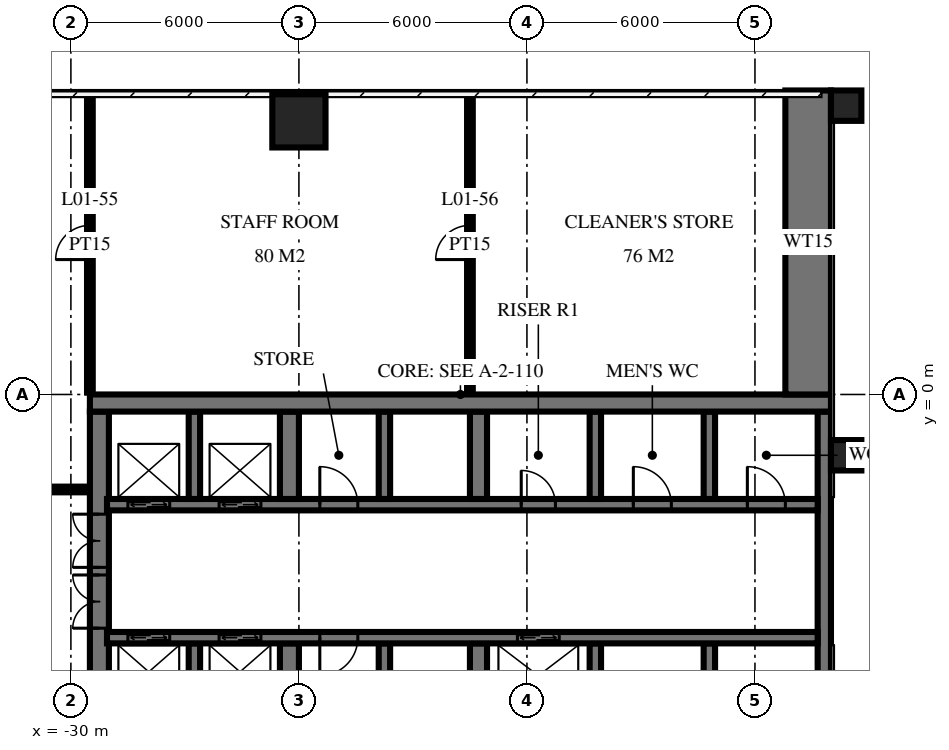
"""IFC4 building model, lengths in metres.
Left out: names, types, materials, properties, quantities, classifications, styles, units other than length and angle.
Written with IfcOpenShell. Run it as: python <this file> out.ifc"""

import sys

from ifc_helpers import new_model, si_unit, direction, frame, frame_2d, origin, origin_2d, place, context, subcontext, project, spatial, rectangle, circle, extrude, element, fill, save


model = new_model("IFC4")
c1 = context("Model", 3, precision=1e-05, world=origin(), true_north=direction((0.0, 1.0)))
c2 = subcontext(c1, "Body", "Model", "MODEL_VIEW")
j1 = project(units=[si_unit("LENGTHUNIT", "METRE"), si_unit("PLANEANGLEUNIT", "RADIAN")], contexts=[c1])
p1 = place(None, origin())
s1 = spatial("IfcSite", under=j1, at=p1, CompositionType="ELEMENT")
p2 = place(p1, origin())
s2 = spatial("IfcBuilding", under=s1, at=p2, CompositionType="ELEMENT")
p3 = place(p2, frame((0.0, 0.0, 7.0)))
s3 = spatial("IfcBuildingStorey", under=s2, at=p3, CompositionType="ELEMENT", Elevation=7.0)
p4 = place(p3, frame((-24.0, 7.2, 0.0), z_axis=(0.0, 0.0, 1.0), x_axis=(1.0, 0.0, 0.0)))
e1 = element("IfcColumn", 1, at=p4, inside=s3, PredefinedType="COLUMN", context=c2, shape_type="SweptSolid", body=[
    extrude(circle(Radius=0.7, at=origin_2d()), origin(), (0.0, 0.0, 1.0), 5.5),
])
p5 = place(p3, frame((-29.5, -0.225, 0.0), z_axis=(0.0, 0.0, 1.0), x_axis=(1.0, 0.0, 0.0)))
e2 = element("IfcWall", 2, at=p5, inside=s3, PredefinedType="SHEAR", context=c2, shape_type="SweptSolid", body=[
    extrude(rectangle(XDim=19.5, YDim=0.45, at=frame_2d((9.75, 0.0))), origin(), (0.0, 0.0, 1.0), 5.5),
])
p6 = place(p3, frame((-10.175, -14.55, 0.0), z_axis=(0.0, 0.0, 1.0), x_axis=(0.0, 1.0, 0.0)))
e3 = element("IfcWall", 3, at=p6, inside=s3, PredefinedType="SHEAR", context=c2, shape_type="SweptSolid", body=[
    extrude(rectangle(XDim=14.1, YDim=0.35, at=frame_2d((7.05, 0.0))), origin(), (0.0, 0.0, 1.0), 5.5),
])
p7 = place(p3, frame((-29.25, -14.55, 0.0), z_axis=(0.0, 0.0, 1.0), x_axis=(0.0, 1.0, 0.0)))
e4 = element("IfcWall", 4, at=p7, inside=s3, PredefinedType="SHEAR", context=c2, shape_type="SweptSolid", body=[
    extrude(rectangle(XDim=14.1, YDim=0.5, at=frame_2d((7.05, 0.0))), origin(), (0.0, 0.0, 1.0), 5.5),
])
p8 = place(p7, frame((8.4, 0.0, 0.0)))
e5 = element("IfcOpeningElement", 5, at=p8, cuts=e4, PredefinedType="OPENING", context=c2, shape_type="SweptSolid", body=[
    extrude(rectangle(XDim=1.4, YDim=2.4, at=frame_2d((0.7, 1.2))), frame((0.0, 0.26, 0.0), z_axis=(0.0, -1.0, 0.0), x_axis=(1.0, 0.0, 0.0)), (0.0, 0.0, 1.0), 0.52),
])
p9 = place(p7, frame((10.0, 0.0, 0.0)))
e6 = element("IfcOpeningElement", 6, at=p9, cuts=e4, PredefinedType="OPENING", context=c2, shape_type="SweptSolid", body=[
    extrude(rectangle(XDim=1.4, YDim=2.4, at=frame_2d((0.7, 1.2))), frame((0.0, 0.26, 0.0), z_axis=(0.0, -1.0, 0.0), x_axis=(1.0, 0.0, 0.0)), (0.0, 0.0, 1.0), 0.52),
])
p10 = place(p3, frame((-29.05, -2.9, 0.0), z_axis=(0.0, 0.0, 1.0), x_axis=(1.0, 0.0, 0.0)))
e7 = element("IfcWall", 7, at=p10, inside=s3, PredefinedType="SHEAR", context=c2, shape_type="SweptSolid", body=[
    extrude(rectangle(XDim=18.7, YDim=0.3, at=frame_2d((9.35, 0.0))), origin(), (0.0, 0.0, 1.0), 5.5),
])
p11 = place(p10, frame((2.95, 0.0, 0.0)))
e8 = element("IfcOpeningElement", 8, at=p11, cuts=e7, PredefinedType="OPENING", context=c2, shape_type="SweptSolid", body=[
    extrude(rectangle(XDim=1.1, YDim=2.1, at=frame_2d((0.55, 1.05))), frame((0.0, 0.16, 0.0), z_axis=(0.0, -1.0, 0.0), x_axis=(1.0, 0.0, 0.0)), (0.0, 0.0, 1.0), 0.32),
])
p12 = place(p10, frame((0.55, 0.0, 0.0)))
e9 = element("IfcOpeningElement", 9, at=p12, cuts=e7, PredefinedType="OPENING", context=c2, shape_type="SweptSolid", body=[
    extrude(rectangle(XDim=1.1, YDim=2.1, at=frame_2d((0.55, 1.05))), frame((0.0, 0.16, 0.0), z_axis=(0.0, -1.0, 0.0), x_axis=(1.0, 0.0, 0.0)), (0.0, 0.0, 1.0), 0.32),
])
p13 = place(p10, frame((10.9, 0.0, 0.0)))
e10 = element("IfcOpeningElement", 10, at=p13, cuts=e7, PredefinedType="OPENING", context=c2, shape_type="SweptSolid", body=[
    extrude(rectangle(XDim=0.9, YDim=2.1, at=frame_2d((0.45, 1.05))), frame((0.0, 0.16, 0.0), z_axis=(0.0, -1.0, 0.0), x_axis=(1.0, 0.0, 0.0)), (0.0, 0.0, 1.0), 0.32),
])
p14 = place(p10, frame((16.85, 0.0, 0.0)))
e11 = element("IfcOpeningElement", 11, at=p14, cuts=e7, PredefinedType="OPENING", context=c2, shape_type="SweptSolid", body=[
    extrude(rectangle(XDim=1.0, YDim=2.1, at=frame_2d((0.5, 1.05))), frame((0.0, 0.16, 0.0), z_axis=(0.0, -1.0, 0.0), x_axis=(1.0, 0.0, 0.0)), (0.0, 0.0, 1.0), 0.32),
])
p15 = place(p10, frame((13.85, 0.0, 0.0)))
e12 = element("IfcOpeningElement", 12, at=p15, cuts=e7, PredefinedType="OPENING", context=c2, shape_type="SweptSolid", body=[
    extrude(rectangle(XDim=1.0, YDim=2.1, at=frame_2d((0.5, 1.05))), frame((0.0, 0.16, 0.0), z_axis=(0.0, -1.0, 0.0), x_axis=(1.0, 0.0, 0.0)), (0.0, 0.0, 1.0), 0.32),
])
p16 = place(p10, frame((5.6, 0.0, 0.0)))
e13 = element("IfcOpeningElement", 13, at=p16, cuts=e7, PredefinedType="OPENING", context=c2, shape_type="SweptSolid", body=[
    extrude(rectangle(XDim=1.0, YDim=2.1, at=frame_2d((0.5, 1.05))), frame((0.0, 0.16, 0.0), z_axis=(0.0, -1.0, 0.0), x_axis=(1.0, 0.0, 0.0)), (0.0, 0.0, 1.0), 0.32),
])
p17 = place(p3, frame((-29.05, -6.4, 0.0), z_axis=(0.0, 0.0, 1.0), x_axis=(1.0, 0.0, 0.0)))
e14 = element("IfcWall", 14, at=p17, inside=s3, PredefinedType="SHEAR", context=c2, shape_type="SweptSolid", body=[
    extrude(rectangle(XDim=18.7, YDim=0.3, at=frame_2d((9.35, 0.0))), origin(), (0.0, 0.0, 1.0), 5.5),
])
p18 = place(p17, frame((2.95, 0.0, 0.0)))
e15 = element("IfcOpeningElement", 15, at=p18, cuts=e14, PredefinedType="OPENING", context=c2, shape_type="SweptSolid", body=[
    extrude(rectangle(XDim=1.1, YDim=2.1, at=frame_2d((0.55, 1.05))), frame((0.0, 0.16, 0.0), z_axis=(0.0, -1.0, 0.0), x_axis=(1.0, 0.0, 0.0)), (0.0, 0.0, 1.0), 0.32),
])
p19 = place(p17, frame((0.55, 0.0, 0.0)))
e16 = element("IfcOpeningElement", 16, at=p19, cuts=e14, PredefinedType="OPENING", context=c2, shape_type="SweptSolid", body=[
    extrude(rectangle(XDim=1.1, YDim=2.1, at=frame_2d((0.55, 1.05))), frame((0.0, 0.16, 0.0), z_axis=(0.0, -1.0, 0.0), x_axis=(1.0, 0.0, 0.0)), (0.0, 0.0, 1.0), 0.32),
])
p20 = place(p17, frame((10.8, 0.0, 0.0)))
e17 = element("IfcOpeningElement", 17, at=p20, cuts=e14, PredefinedType="OPENING", context=c2, shape_type="SweptSolid", body=[
    extrude(rectangle(XDim=1.1, YDim=2.1, at=frame_2d((0.55, 1.05))), frame((0.0, 0.16, 0.0), z_axis=(0.0, -1.0, 0.0), x_axis=(1.0, 0.0, 0.0)), (0.0, 0.0, 1.0), 0.32),
])
p21 = place(p17, frame((5.6, 0.0, 0.0)))
e18 = element("IfcOpeningElement", 18, at=p21, cuts=e14, PredefinedType="OPENING", context=c2, shape_type="SweptSolid", body=[
    extrude(rectangle(XDim=1.0, YDim=2.1, at=frame_2d((0.5, 1.05))), frame((0.0, 0.16, 0.0), z_axis=(0.0, -1.0, 0.0), x_axis=(1.0, 0.0, 0.0)), (0.0, 0.0, 1.0), 0.32),
])
for number, where, z_axis, x_axis in (
    (19, (-13.2, -2.75, 0.0), (0.0, 0.0, 1.0), (0.0, 1.0, 0.0)),
    (20, (-13.2, -8.85, 0.0), (0.0, 0.0, 1.0), (0.0, 1.0, 0.0)),
    (21, (-16.2, -2.75, 0.0), (0.0, 0.0, 1.0), (0.0, 1.0, 0.0)),
    (22, (-16.2, -8.85, 0.0), (0.0, 0.0, 1.0), (0.0, 1.0, 0.0)),
):
    element("IfcWall", number, at=place(p3, frame(where, z_axis=z_axis, x_axis=x_axis)), inside=s3, PredefinedType="SHEAR", context=c2, shape_type="SweptSolid", body=[
        extrude(rectangle(XDim=2.3, YDim=0.3, at=frame_2d((1.15, 0.0))), origin(), (0.0, 0.0, 1.0), 5.5),
    ])
for number, where, z_axis, x_axis in (
    (23, (-19.275, -2.75, 0.0), (0.0, 0.0, 1.0), (0.0, 1.0, 0.0)),
    (24, (-19.275, -8.85, 0.0), (0.0, 0.0, 1.0), (0.0, 1.0, 0.0)),
):
    element("IfcWall", number, at=place(p3, frame(where, z_axis=z_axis, x_axis=x_axis)), inside=s3, PredefinedType="SHEAR", context=c2, shape_type="SweptSolid", body=[
        extrude(rectangle(XDim=2.3, YDim=0.45, at=frame_2d((1.15, 0.0))), origin(), (0.0, 0.0, 1.0), 5.5),
    ])
for number, where, z_axis, x_axis in (
    (25, (-21.75, -2.75, 0.0), (0.0, 0.0, 1.0), (0.0, 1.0, 0.0)),
    (26, (-21.75, -8.85, 0.0), (0.0, 0.0, 1.0), (0.0, 1.0, 0.0)),
):
    element("IfcWall", number, at=place(p3, frame(where, z_axis=z_axis, x_axis=x_axis)), inside=s3, PredefinedType="SHEAR", context=c2, shape_type="SweptSolid", body=[
        extrude(rectangle(XDim=2.3, YDim=0.3, at=frame_2d((1.15, 0.0))), origin(), (0.0, 0.0, 1.0), 5.5),
    ])
for number, where, z_axis, x_axis in (
    (27, (-24.25, -2.75, 0.0), (0.0, 0.0, 1.0), (0.0, 1.0, 0.0)),
    (28, (-24.25, -8.85, 0.0), (0.0, 0.0, 1.0), (0.0, 1.0, 0.0)),
):
    element("IfcWall", number, at=place(p3, frame(where, z_axis=z_axis, x_axis=x_axis)), inside=s3, PredefinedType="SHEAR", context=c2, shape_type="SweptSolid", body=[
        extrude(rectangle(XDim=2.3, YDim=0.5, at=frame_2d((1.15, 0.0))), origin(), (0.0, 0.0, 1.0), 5.5),
    ])
for number, where, z_axis, x_axis in (
    (29, (-26.75, -2.75, 0.0), (0.0, 0.0, 1.0), (0.0, 1.0, 0.0)),
    (30, (-26.75, -8.85, 0.0), (0.0, 0.0, 1.0), (0.0, 1.0, 0.0)),
):
    element("IfcWall", number, at=place(p3, frame(where, z_axis=z_axis, x_axis=x_axis)), inside=s3, PredefinedType="SHEAR", context=c2, shape_type="SweptSolid", body=[
        extrude(rectangle(XDim=2.3, YDim=0.3, at=frame_2d((1.15, 0.0))), origin(), (0.0, 0.0, 1.0), 5.5),
    ])
p22 = place(p3, frame((-10.6, 0.0, 0.0), z_axis=(0.0, 0.0, 1.0), x_axis=(0.0, 1.0, 0.0)))
e31 = element("IfcWall", 31, at=p22, inside=s3, PredefinedType="SHEAR", context=c2, shape_type="SweptSolid", body=[
    extrude(rectangle(XDim=8.0, YDim=1.2, at=frame_2d((4.0, 0.0))), origin(), (0.0, 0.0, 1.0), 5.5),
])
for number, where, z_axis, x_axis in (
    (32, (-9.6, -1.6, 0.0), (0.0, 0.0, 1.0), (1.0, 0.0, 0.0)),
    (33, (-9.6, 7.6, 0.0), (0.0, 0.0, 1.0), (1.0, 0.0, 0.0)),
):
    element("IfcColumn", number, at=place(p3, frame(where, z_axis=z_axis, x_axis=x_axis)), inside=s3, PredefinedType="COLUMN", context=c2, shape_type="SweptSolid", body=[
        extrude(rectangle(XDim=0.8, YDim=0.8, at=origin_2d()), origin(), (0.0, 0.0, 1.0), 5.5),
    ])
p23 = place(p3, frame((-19.5, 0.05, 0.0), z_axis=(0.0, 0.0, 1.0), x_axis=(0.0, 1.0, 0.0)))
e34 = element("IfcWall", 34, at=p23, inside=s3, PredefinedType="PARTITIONING", context=c2, shape_type="SweptSolid", body=[
    extrude(rectangle(XDim=7.77, YDim=0.15, at=frame_2d((3.885, 0.0))), origin(), (0.0, 0.0, 1.0), 5.05),
])
p24 = place(p23, frame((3.5, 0.0, 0.0)))
e35 = element("IfcOpeningElement", 35, at=p24, cuts=e34, PredefinedType="OPENING", context=c2, shape_type="SweptSolid", body=[
    extrude(rectangle(XDim=0.9, YDim=2.1, at=frame_2d((0.45, 1.05))), frame((0.0, 0.085, 0.0), z_axis=(0.0, -1.0, 0.0), x_axis=(1.0, 0.0, 0.0)), (0.0, 0.0, 1.0), 0.17),
])
p25 = place(p3, frame((-29.5, 0.05, 0.0), z_axis=(0.0, 0.0, 1.0), x_axis=(0.0, 1.0, 0.0)))
e36 = element("IfcWall", 36, at=p25, inside=s3, PredefinedType="PARTITIONING", context=c2, shape_type="SweptSolid", body=[
    extrude(rectangle(XDim=7.77, YDim=0.15, at=frame_2d((3.885, 0.0))), origin(), (0.0, 0.0, 1.0), 5.05),
])
p26 = place(p25, frame((3.5, 0.0, 0.0)))
e37 = element("IfcOpeningElement", 37, at=p26, cuts=e36, PredefinedType="OPENING", context=c2, shape_type="SweptSolid", body=[
    extrude(rectangle(XDim=0.9, YDim=2.1, at=frame_2d((0.45, 1.05))), frame((0.0, 0.085, 0.0), z_axis=(0.0, -1.0, 0.0), x_axis=(1.0, 0.0, 0.0)), (0.0, 0.0, 1.0), 0.17),
])
p27 = place(p3, frame((-31.9, -2.5, 0.0), z_axis=(0.0, 0.0, 1.0), x_axis=(1.0, 0.0, 0.0)))
e38 = element("IfcWall", 38, at=p27, inside=s3, PredefinedType="PARTITIONING", context=c2, shape_type="SweptSolid", body=[
    extrude(rectangle(XDim=2.35, YDim=0.15, at=frame_2d((1.175, 0.0))), origin(), (0.0, 0.0, 1.0), 5.05),
])
p28 = place(p11, origin())
e39 = element("IfcDoor", 39, at=p28, inside=s3, OperationType="DOUBLE_DOOR_SLIDING", PredefinedType="USERDEFINED", context=c2, shape_type="SweptSolid", body=[
    extrude(rectangle(XDim=1.1, YDim=2.1, at=frame_2d((0.55, 1.05))), frame((0.0, 0.025, 0.0), z_axis=(0.0, -1.0, 0.0), x_axis=(1.0, 0.0, 0.0)), (0.0, 0.0, 1.0), 0.05),
])
fill(e8, e39)
p29 = place(p12, origin())
e40 = element("IfcDoor", 40, at=p29, inside=s3, OperationType="DOUBLE_DOOR_SLIDING", PredefinedType="USERDEFINED", context=c2, shape_type="SweptSolid", body=[
    extrude(rectangle(XDim=1.1, YDim=2.1, at=frame_2d((0.55, 1.05))), frame((0.0, 0.025, 0.0), z_axis=(0.0, -1.0, 0.0), x_axis=(1.0, 0.0, 0.0)), (0.0, 0.0, 1.0), 0.05),
])
fill(e9, e40)
p30 = place(p18, origin())
e41 = element("IfcDoor", 41, at=p30, inside=s3, OperationType="DOUBLE_DOOR_SLIDING", PredefinedType="USERDEFINED", context=c2, shape_type="SweptSolid", body=[
    extrude(rectangle(XDim=1.1, YDim=2.1, at=frame_2d((0.55, 1.05))), frame((0.0, 0.025, 0.0), z_axis=(0.0, -1.0, 0.0), x_axis=(1.0, 0.0, 0.0)), (0.0, 0.0, 1.0), 0.05),
])
fill(e15, e41)
p31 = place(p19, origin())
e42 = element("IfcDoor", 42, at=p31, inside=s3, OperationType="DOUBLE_DOOR_SLIDING", PredefinedType="USERDEFINED", context=c2, shape_type="SweptSolid", body=[
    extrude(rectangle(XDim=1.1, YDim=2.1, at=frame_2d((0.55, 1.05))), frame((0.0, 0.025, 0.0), z_axis=(0.0, -1.0, 0.0), x_axis=(1.0, 0.0, 0.0)), (0.0, 0.0, 1.0), 0.05),
])
fill(e16, e42)
p32 = place(p20, origin())
e43 = element("IfcDoor", 43, at=p32, inside=s3, OperationType="DOUBLE_DOOR_SLIDING", PredefinedType="USERDEFINED", context=c2, shape_type="SweptSolid", body=[
    extrude(rectangle(XDim=1.1, YDim=2.1, at=frame_2d((0.55, 1.05))), frame((0.0, 0.025, 0.0), z_axis=(0.0, -1.0, 0.0), x_axis=(1.0, 0.0, 0.0)), (0.0, 0.0, 1.0), 0.05),
])
fill(e17, e43)
p33 = place(p8, origin())
e44 = element("IfcDoor", 44, at=p33, inside=s3, OperationType="DOUBLE_DOOR_SINGLE_SWING", PredefinedType="DOOR", context=c2, shape_type="SweptSolid", body=[
    extrude(rectangle(XDim=1.4, YDim=2.4, at=frame_2d((0.7, 1.2))), frame((0.0, 0.025, 0.0), z_axis=(0.0, -1.0, 0.0), x_axis=(1.0, 0.0, 0.0)), (0.0, 0.0, 1.0), 0.05),
])
fill(e5, e44)
p34 = place(p9, origin())
e45 = element("IfcDoor", 45, at=p34, inside=s3, OperationType="DOUBLE_DOOR_SINGLE_SWING", PredefinedType="DOOR", context=c2, shape_type="SweptSolid", body=[
    extrude(rectangle(XDim=1.4, YDim=2.4, at=frame_2d((0.7, 1.2))), frame((0.0, 0.025, 0.0), z_axis=(0.0, -1.0, 0.0), x_axis=(1.0, 0.0, 0.0)), (0.0, 0.0, 1.0), 0.05),
])
fill(e6, e45)
p35 = place(p13, origin())
e46 = element("IfcDoor", 46, at=p35, inside=s3, OperationType="SINGLE_SWING_RIGHT", PredefinedType="DOOR", context=c2, shape_type="SweptSolid", body=[
    extrude(rectangle(XDim=0.9, YDim=2.1, at=frame_2d((0.45, 1.05))), frame((0.0, 0.025, 0.0), z_axis=(0.0, -1.0, 0.0), x_axis=(1.0, 0.0, 0.0)), (0.0, 0.0, 1.0), 0.05),
])
fill(e10, e46)
p36 = place(p14, origin())
e47 = element("IfcDoor", 47, at=p36, inside=s3, OperationType="SINGLE_SWING_RIGHT", PredefinedType="DOOR", context=c2, shape_type="SweptSolid", body=[
    extrude(rectangle(XDim=1.0, YDim=2.1, at=frame_2d((0.5, 1.05))), frame((0.0, 0.025, 0.0), z_axis=(0.0, -1.0, 0.0), x_axis=(1.0, 0.0, 0.0)), (0.0, 0.0, 1.0), 0.05),
])
fill(e11, e47)
p37 = place(p15, origin())
e48 = element("IfcDoor", 48, at=p37, inside=s3, OperationType="SINGLE_SWING_RIGHT", PredefinedType="DOOR", context=c2, shape_type="SweptSolid", body=[
    extrude(rectangle(XDim=1.0, YDim=2.1, at=frame_2d((0.5, 1.05))), frame((0.0, 0.025, 0.0), z_axis=(0.0, -1.0, 0.0), x_axis=(1.0, 0.0, 0.0)), (0.0, 0.0, 1.0), 0.05),
])
fill(e12, e48)
p38 = place(p16, origin())
e49 = element("IfcDoor", 49, at=p38, inside=s3, OperationType="SINGLE_SWING_RIGHT", PredefinedType="DOOR", context=c2, shape_type="SweptSolid", body=[
    extrude(rectangle(XDim=1.0, YDim=2.1, at=frame_2d((0.5, 1.05))), frame((0.0, 0.025, 0.0), z_axis=(0.0, -1.0, 0.0), x_axis=(1.0, 0.0, 0.0)), (0.0, 0.0, 1.0), 0.05),
])
fill(e13, e49)
p39 = place(p21, frame((0.5, 0.0, 0.0), z_axis=(0.0, 0.0, 1.0), x_axis=(-1.0, 0.0, 0.0)))
e50 = element("IfcDoor", 50, at=p39, inside=s3, OperationType="SINGLE_SWING_LEFT", PredefinedType="DOOR", context=c2, shape_type="SweptSolid", body=[
    extrude(rectangle(XDim=1.0, YDim=2.1, at=frame_2d((0.0, 1.05))), frame((0.0, -0.025, 0.0), z_axis=(0.0, 1.0, 0.0), x_axis=(-1.0, 0.0, 0.0)), (0.0, 0.0, 1.0), 0.05),
])
fill(e18, e50)
p40 = place(p26, origin())
e51 = element("IfcDoor", 51, at=p40, inside=s3, OperationType="SINGLE_SWING_RIGHT", PredefinedType="DOOR", context=c2, shape_type="SweptSolid", body=[
    extrude(rectangle(XDim=0.9, YDim=2.1, at=frame_2d((0.45, 1.05))), frame((0.0, 0.025, 0.0), z_axis=(0.0, -1.0, 0.0), x_axis=(1.0, 0.0, 0.0)), (0.0, 0.0, 1.0), 0.05),
])
fill(e37, e51)
p41 = place(p24, origin())
e52 = element("IfcDoor", 52, at=p41, inside=s3, OperationType="SINGLE_SWING_RIGHT", PredefinedType="DOOR", context=c2, shape_type="SweptSolid", body=[
    extrude(rectangle(XDim=0.9, YDim=2.1, at=frame_2d((0.45, 1.05))), frame((0.0, 0.025, 0.0), z_axis=(0.0, -1.0, 0.0), x_axis=(1.0, 0.0, 0.0)), (0.0, 0.0, 1.0), 0.05),
])
fill(e35, e52)
save(model, sys.argv[1])
